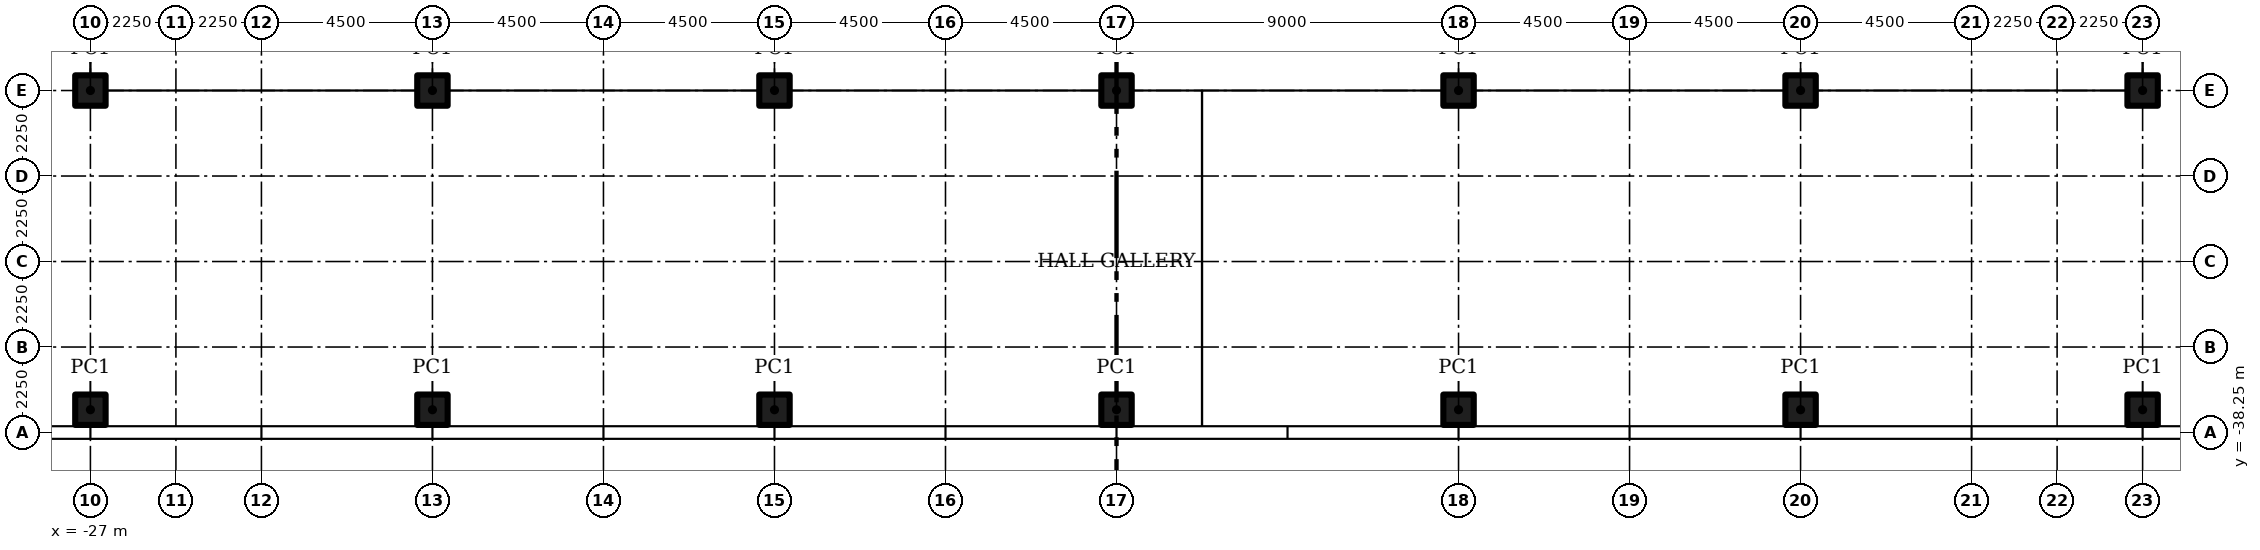
"""IFC4 building model, lengths in metres.
Left out: names, types, materials, properties, quantities, classifications, styles, units other than length and angle.
Written with IfcOpenShell. Run it as: python <this file> out.ifc"""

import sys

from ifc_helpers import new_model, si_unit, direction, frame, frame_2d, origin, origin_2d, place, context, subcontext, project, spatial, rectangle, hollow_rectangle, extrude, element, save


model = new_model("IFC4")
c1 = context("Model", 3, precision=1e-05, world=origin(), true_north=direction((0.0, 1.0)))
c2 = subcontext(c1, "Body", "Model", "MODEL_VIEW")
j1 = project(units=[si_unit("LENGTHUNIT", "METRE"), si_unit("PLANEANGLEUNIT", "RADIAN")], contexts=[c1])
p1 = place(None, origin())
s1 = spatial("IfcSite", under=j1, at=p1, CompositionType="ELEMENT")
p2 = place(p1, origin())
s2 = spatial("IfcBuilding", under=s1, at=p2, CompositionType="ELEMENT")
p3 = place(p2, frame((0.0, 0.0, 6.5)))
s3 = spatial("IfcBuildingStorey", under=s2, at=p3, CompositionType="ELEMENT", Elevation=6.5)
for number, where in (
    (1, (-27.0, -37.65, 0.0)),
    (2, (-27.0, -29.25, 0.0)),
    (3, (-18.0, -37.65, 0.0)),
    (4, (-18.0, -29.25, 0.0)),
    (5, (-9.0, -37.65, 0.0)),
    (6, (-9.0, -29.25, 0.0)),
    (7, (0.0, -37.65, 0.0)),
    (8, (0.0, -29.25, 0.0)),
    (9, (9.0, -37.65, 0.0)),
    (10, (9.0, -29.25, 0.0)),
    (11, (18.0, -37.65, 0.0)),
    (12, (18.0, -29.25, 0.0)),
    (13, (27.0, -37.65, 0.0)),
    (14, (27.0, -29.25, 0.0)),
):
    element("IfcColumn", number, at=place(p3, frame(where)), inside=s3, PredefinedType="COLUMN", context=c2, shape_type="SweptSolid", body=[
        extrude(hollow_rectangle(XDim=0.8, YDim=0.8, WallThickness=0.03, at=origin_2d()), origin(), (0.0, 0.0, 1.0), 5.6),
    ])
p4 = place(p2, origin())
s4 = spatial("IfcBuildingStorey", under=s2, at=p4, CompositionType="ELEMENT", Elevation=0.0)
p5 = place(p4, frame((-26.9, -38.155, 0.0), z_axis=(0.0, 0.0, 1.0), x_axis=(0.0, 1.0, 0.0)))
e15 = element("IfcWall", 15, at=p5, inside=s4, PredefinedType="PARTITIONING", context=c2, shape_type="SweptSolid", body=[
    extrude(rectangle(XDim=31.405, YDim=0.2, at=frame_2d((15.703, 0.0))), origin(), (0.0, 0.0, 1.0), 12.1),
])
p6 = place(p4, frame((27.0, -6.75, 0.0), z_axis=(0.0, 0.0, 1.0), x_axis=(0.0, -1.0, 0.0)))
e16 = element("IfcWall", 16, at=p6, inside=s4, PredefinedType="PARTITIONING", context=c2, shape_type="SweptSolid", body=[
    extrude(rectangle(XDim=22.375, YDim=0.25, at=frame_2d((11.188, 0.0))), origin(), (0.0, 0.0, 1.0), 12.1),
])
p7 = place(p6, frame((10.05, 0.0, 0.0)))
e17 = element("IfcOpeningElement", 17, at=p7, cuts=e16, PredefinedType="OPENING", context=c2, shape_type="SweptSolid", body=[
    extrude(rectangle(XDim=1.8, YDim=2.4, at=frame_2d((0.9, 1.2))), frame((0.0, 0.135, 0.0), z_axis=(0.0, -1.0, 0.0), x_axis=(1.0, 0.0, 0.0)), (0.0, 0.0, 1.0), 0.27),
])
p8 = place(p4, frame((27.125, -29.25, 0.0), z_axis=(0.0, 0.0, 1.0), x_axis=(-1.0, 0.0, 0.0)))
e18 = element("IfcWall", 18, at=p8, inside=s4, PredefinedType="PARTITIONING", context=c2, shape_type="SweptSolid", body=[
    extrude(rectangle(XDim=54.025, YDim=0.25, at=frame_2d((27.012, 0.0))), origin(), (0.0, 0.0, 1.0), 12.1),
])
p9 = place(p8, frame((10.025, 0.0, 0.0)))
e19 = element("IfcOpeningElement", 19, at=p9, cuts=e18, PredefinedType="OPENING", context=c2, shape_type="SweptSolid", body=[
    extrude(rectangle(XDim=1.8, YDim=2.4, at=frame_2d((0.9, 1.2))), frame((0.0, 0.135, 0.0), z_axis=(0.0, -1.0, 0.0), x_axis=(1.0, 0.0, 0.0)), (0.0, 0.0, 1.0), 0.27),
])
p10 = place(p8, frame((42.425, 0.0, 0.0)))
e20 = element("IfcOpeningElement", 20, at=p10, cuts=e18, PredefinedType="OPENING", context=c2, shape_type="SweptSolid", body=[
    extrude(rectangle(XDim=1.8, YDim=2.4, at=frame_2d((0.9, 1.2))), frame((0.0, 0.135, 0.0), z_axis=(0.0, -1.0, 0.0), x_axis=(1.0, 0.0, 0.0)), (0.0, 0.0, 1.0), 0.27),
])
save(model, sys.argv[1])
